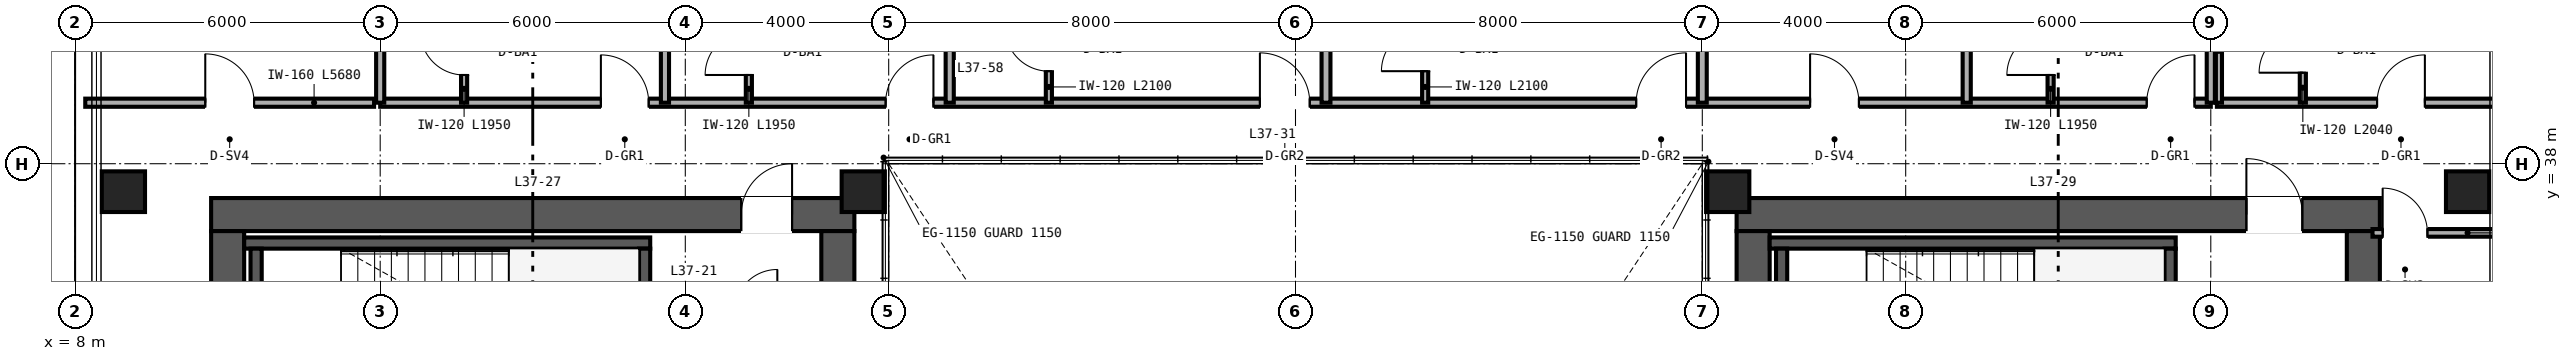
"""IFC4 building model, lengths in metres.
Left out: names, types, materials, properties, quantities, classifications, styles, units other than length and angle.
Written with IfcOpenShell. Run it as: python <this file> out.ifc"""

import sys

from ifc_helpers import new_model, si_unit, direction, frame, frame_2d, origin, origin_2d, place, context, subcontext, project, spatial, rectangle, hollow_rectangle, extrude, source, transform, mapped, element, fill, save


model = new_model("IFC4")
c1 = context("Model", 3, precision=1e-05, world=origin(), true_north=direction((0.0, 1.0)))
c2 = subcontext(c1, "Body", "Model", "MODEL_VIEW")
j1 = project(units=[si_unit("LENGTHUNIT", "METRE"), si_unit("PLANEANGLEUNIT", "RADIAN")], contexts=[c1])
p1 = place(None, origin())
s1 = spatial("IfcSite", under=j1, at=p1, CompositionType="ELEMENT")
p2 = place(p1, origin())
s2 = spatial("IfcBuilding", under=s1, at=p2, CompositionType="ELEMENT")
p3 = place(p2, frame((0.0, 0.0, 147.6)))
s3 = spatial("IfcBuildingStorey", under=s2, at=p3, CompositionType="ELEMENT", Elevation=147.6)
p4 = place(p3, frame((10.675, 37.0, 0.0), z_axis=(0.0, 0.0, 1.0), x_axis=(1.0, 0.0, 0.0)))
e1 = element("IfcWall", 1, at=p4, inside=s3, PredefinedType="SHEAR", context=c2, shape_type="SweptSolid", body=[
    extrude(rectangle(XDim=12.65, YDim=0.65, at=frame_2d((6.325, 0.0))), origin(), (0.0, 0.0, 1.0), 3.28),
])
p5 = place(p4, frame((10.425, 0.0, 0.0)))
e2 = element("IfcOpeningElement", 2, at=p5, cuts=e1, PredefinedType="OPENING", context=c2, shape_type="SweptSolid", body=[
    extrude(rectangle(XDim=1.0, YDim=2.15, at=frame_2d((0.5, 1.075))), frame((0.0, 0.335, 0.0), z_axis=(0.0, -1.0, 0.0), x_axis=(1.0, 0.0, 0.0)), (0.0, 0.0, 1.0), 0.67),
])
for number, where, z_axis, x_axis in (
    (3, (11.0, 15.325, 0.0), (0.0, 0.0, 1.0), (0.0, 1.0, 0.0)),
    (4, (23.0, 15.325, 0.0), (0.0, 0.0, 1.0), (0.0, 1.0, 0.0)),
):
    element("IfcWall", number, at=place(p3, frame(where, z_axis=z_axis, x_axis=x_axis)), inside=s3, PredefinedType="SHEAR", context=c2, shape_type="SweptSolid", body=[
        extrude(rectangle(XDim=21.35, YDim=0.65, at=frame_2d((10.675, 0.0))), origin(), (0.0, 0.0, 1.0), 3.28),
    ])
p6 = place(p3, frame((40.675, 37.0, 0.0), z_axis=(0.0, 0.0, 1.0), x_axis=(1.0, 0.0, 0.0)))
e5 = element("IfcWall", 5, at=p6, inside=s3, PredefinedType="SHEAR", context=c2, shape_type="SweptSolid", body=[
    extrude(rectangle(XDim=12.65, YDim=0.65, at=frame_2d((6.325, 0.0))), origin(), (0.0, 0.0, 1.0), 3.28),
])
p7 = place(p6, frame((10.025, 0.0, 0.0)))
e6 = element("IfcOpeningElement", 6, at=p7, cuts=e5, PredefinedType="OPENING", context=c2, shape_type="SweptSolid", body=[
    extrude(rectangle(XDim=1.1, YDim=2.15, at=frame_2d((0.55, 1.075))), frame((0.0, 0.335, 0.0), z_axis=(0.0, -1.0, 0.0), x_axis=(1.0, 0.0, 0.0)), (0.0, 0.0, 1.0), 0.67),
])
for number, where, z_axis, x_axis in (
    (7, (41.0, 15.325, 0.0), (0.0, 0.0, 1.0), (0.0, 1.0, 0.0)),
    (8, (53.0, 15.325, 0.0), (0.0, 0.0, 1.0), (0.0, 1.0, 0.0)),
):
    element("IfcWall", number, at=place(p3, frame(where, z_axis=z_axis, x_axis=x_axis)), inside=s3, PredefinedType="SHEAR", context=c2, shape_type="SweptSolid", body=[
        extrude(rectangle(XDim=21.35, YDim=0.65, at=frame_2d((10.675, 0.0))), origin(), (0.0, 0.0, 1.0), 3.28),
    ])
p8 = place(p3, frame((11.325, 36.44, 0.0), z_axis=(0.0, 0.0, 1.0), x_axis=(1.0, 0.0, 0.0)))
e9 = element("IfcWall", 9, at=p8, inside=s3, PredefinedType="SHEAR", context=c2, shape_type="SweptSolid", body=[
    extrude(rectangle(XDim=7.985, YDim=0.22, at=frame_2d((3.993, 0.0))), origin(), (0.0, 0.0, 1.0), 3.4),
])
for number, where, z_axis, x_axis in (
    (10, (11.56, 33.05, 0.0), (0.0, 0.0, 1.0), (0.0, 1.0, 0.0)),
    (11, (19.2, 33.05, 0.0), (0.0, 0.0, 1.0), (0.0, 1.0, 0.0)),
):
    element("IfcWall", number, at=place(p3, frame(where, z_axis=z_axis, x_axis=x_axis)), inside=s3, PredefinedType="SHEAR", context=c2, shape_type="SweptSolid", body=[
        extrude(rectangle(XDim=3.28, YDim=0.22, at=frame_2d((1.64, 0.0))), origin(), (0.0, 0.0, 1.0), 3.4),
    ])
p9 = place(p3, frame((41.325, 36.44, 0.0), z_axis=(0.0, 0.0, 1.0), x_axis=(1.0, 0.0, 0.0)))
e12 = element("IfcWall", 12, at=p9, inside=s3, PredefinedType="SHEAR", context=c2, shape_type="SweptSolid", body=[
    extrude(rectangle(XDim=7.985, YDim=0.22, at=frame_2d((3.993, 0.0))), origin(), (0.0, 0.0, 1.0), 3.4),
])
for number, where, z_axis, x_axis in (
    (13, (41.56, 33.05, 0.0), (0.0, 0.0, 1.0), (0.0, 1.0, 0.0)),
    (14, (49.2, 33.05, 0.0), (0.0, 0.0, 1.0), (0.0, 1.0, 0.0)),
):
    element("IfcWall", number, at=place(p3, frame(where, z_axis=z_axis, x_axis=x_axis)), inside=s3, PredefinedType="SHEAR", context=c2, shape_type="SweptSolid", body=[
        extrude(rectangle(XDim=3.28, YDim=0.22, at=frame_2d((1.64, 0.0))), origin(), (0.0, 0.0, 1.0), 3.4),
    ])
m1 = source(origin(), c2, "Body", "SweptSolid", [
    extrude(hollow_rectangle(XDim=0.85, YDim=0.8, WallThickness=0.032, at=origin_2d()), origin(), (0.0, 0.0, 1.0), 3.28),
])
for number, where, z_axis, x_axis in (
    (15, (8.95, 37.45, 0.0), (0.0, 0.0, 1.0), (1.0, 0.0, 0.0)),
    (16, (23.5, 37.45, 0.0), (0.0, 0.0, 1.0), (1.0, 0.0, 0.0)),
    (17, (40.5, 37.45, 0.0), (0.0, 0.0, 1.0), (1.0, 0.0, 0.0)),
    (18, (55.05, 37.45, 0.0), (0.0, 0.0, 1.0), (1.0, 0.0, 0.0)),
):
    element("IfcColumn", number, at=place(p3, frame(where, z_axis=z_axis, x_axis=x_axis)), inside=s3, PredefinedType="COLUMN", context=c2, shape_type="MappedRepresentation", body=[
        mapped(m1, transform((0.0, 0.0, 0.0), scale=1.0)),
    ])
p10 = place(p3, frame((53.18, 36.64, 0.0), z_axis=(0.0, 0.0, 1.0), x_axis=(1.0, 0.0, 0.0)))
e19 = element("IfcWall", 19, at=p10, inside=s3, PredefinedType="PARTITIONING", context=c2, shape_type="SweptSolid", body=[
    extrude(rectangle(XDim=2.66, YDim=0.15, at=frame_2d((1.33, 0.0))), origin(), (0.0, 0.0, 1.0), 2.663),
])
p11 = place(p10, frame((0.2, 0.0, 0.0)))
e20 = element("IfcOpeningElement", 20, at=p11, cuts=e19, PredefinedType="OPENING", context=c2, shape_type="SweptSolid", body=[
    extrude(rectangle(XDim=0.88, YDim=2.15, at=frame_2d((0.44, 1.075))), frame((0.0, 0.085, 0.0), z_axis=(0.0, -1.0, 0.0), x_axis=(1.0, 0.0, 0.0)), (0.0, 0.0, 1.0), 0.17),
])
p12 = place(p3, frame((8.2, 39.2, 0.0), z_axis=(0.0, 0.0, 1.0), x_axis=(1.0, 0.0, 0.0)))
e21 = element("IfcWall", 21, at=p12, inside=s3, PredefinedType="PARTITIONING", context=c2, shape_type="SweptSolid", body=[
    extrude(rectangle(XDim=5.68, YDim=0.16, at=frame_2d((2.84, 0.0))), origin(), (0.0, 0.0, 1.0), 3.28),
])
p13 = place(p12, frame((2.36, 0.0, 0.0)))
e22 = element("IfcOpeningElement", 22, at=p13, cuts=e21, PredefinedType="OPENING", context=c2, shape_type="SweptSolid", body=[
    extrude(rectangle(XDim=0.96, YDim=2.15, at=frame_2d((0.48, 1.075))), frame((0.0, 0.09, 0.0), z_axis=(0.0, -1.0, 0.0), x_axis=(1.0, 0.0, 0.0)), (0.0, 0.0, 1.0), 0.18),
])
p14 = place(p3, frame((50.12, 39.2, 0.0), z_axis=(0.0, 0.0, 1.0), x_axis=(1.0, 0.0, 0.0)))
e23 = element("IfcWall", 23, at=p14, inside=s3, PredefinedType="PARTITIONING", context=c2, shape_type="SweptSolid", body=[
    extrude(rectangle(XDim=5.68, YDim=0.16, at=frame_2d((2.84, 0.0))), origin(), (0.0, 0.0, 1.0), 3.28),
])
p15 = place(p14, frame((3.15, 0.0, 0.0)))
e24 = element("IfcOpeningElement", 24, at=p15, cuts=e23, PredefinedType="OPENING", context=c2, shape_type="SweptSolid", body=[
    extrude(rectangle(XDim=0.94, YDim=2.15, at=frame_2d((0.47, 1.075))), frame((0.0, 0.09, 0.0), z_axis=(0.0, -1.0, 0.0), x_axis=(1.0, 0.0, 0.0)), (0.0, 0.0, 1.0), 0.18),
])
p16 = place(p3, frame((51.81, 39.2, 0.0), z_axis=(0.0, 0.0, 1.0), x_axis=(0.0, 1.0, 0.0)))
e25 = element("IfcWall", 25, at=p16, inside=s3, PredefinedType="PARTITIONING", context=c2, shape_type="SweptSolid", body=[
    extrude(rectangle(XDim=2.04, YDim=0.12, at=frame_2d((1.02, 0.0))), origin(), (0.0, 0.0, 1.0), 3.28),
])
p17 = place(p16, frame((0.59, 0.0, 0.0)))
e26 = element("IfcOpeningElement", 26, at=p17, cuts=e25, PredefinedType="OPENING", context=c2, shape_type="SweptSolid", body=[
    extrude(rectangle(XDim=0.86, YDim=2.1, at=frame_2d((0.43, 1.05))), frame((0.0, 0.07, 0.0), z_axis=(0.0, -1.0, 0.0), x_axis=(1.0, 0.0, 0.0)), (0.0, 0.0, 1.0), 0.14),
])
p18 = place(p3, frame((50.16, 39.2, 0.0), z_axis=(0.0, 0.0, 1.0), x_axis=(0.0, 1.0, 0.0)))
e27 = element("IfcWall", 27, at=p18, inside=s3, PredefinedType="PARTITIONING", context=c2, shape_type="SweptSolid", body=[
    extrude(rectangle(XDim=2.04, YDim=0.12, at=frame_2d((1.02, 0.0))), origin(), (0.0, 0.0, 1.0), 3.28),
])
p19 = place(p3, frame((14.0, 39.2, 0.0), z_axis=(0.0, 0.0, 1.0), x_axis=(1.0, 0.0, 0.0)))
e28 = element("IfcWall", 28, at=p19, inside=s3, PredefinedType="PARTITIONING", context=c2, shape_type="SweptSolid", body=[
    extrude(rectangle(XDim=36.0, YDim=0.16, at=frame_2d((18.0, 0.0))), origin(), (0.0, 0.0, 1.0), 2.501),
])
p20 = place(p19, frame((4.34, 0.0, 0.0)))
e29 = element("IfcOpeningElement", 29, at=p20, cuts=e28, PredefinedType="OPENING", context=c2, shape_type="SweptSolid", body=[
    extrude(rectangle(XDim=0.94, YDim=2.15, at=frame_2d((0.47, 1.075))), frame((0.0, 0.09, 0.0), z_axis=(0.0, -1.0, 0.0), x_axis=(1.0, 0.0, 0.0)), (0.0, 0.0, 1.0), 0.18),
])
p21 = place(p19, frame((9.94, 0.0, 0.0)))
e30 = element("IfcOpeningElement", 30, at=p21, cuts=e28, PredefinedType="OPENING", context=c2, shape_type="SweptSolid", body=[
    extrude(rectangle(XDim=0.94, YDim=2.15, at=frame_2d((0.47, 1.075))), frame((0.0, 0.09, 0.0), z_axis=(0.0, -1.0, 0.0), x_axis=(1.0, 0.0, 0.0)), (0.0, 0.0, 1.0), 0.18),
])
p22 = place(p19, frame((17.3, 0.0, 0.0)))
e31 = element("IfcOpeningElement", 31, at=p22, cuts=e28, PredefinedType="OPENING", context=c2, shape_type="SweptSolid", body=[
    extrude(rectangle(XDim=0.98, YDim=2.2, at=frame_2d((0.49, 1.1))), frame((0.0, 0.09, 0.0), z_axis=(0.0, -1.0, 0.0), x_axis=(1.0, 0.0, 0.0)), (0.0, 0.0, 1.0), 0.18),
])
p23 = place(p19, frame((24.7, 0.0, 0.0)))
e32 = element("IfcOpeningElement", 32, at=p23, cuts=e28, PredefinedType="OPENING", context=c2, shape_type="SweptSolid", body=[
    extrude(rectangle(XDim=0.98, YDim=2.2, at=frame_2d((0.49, 1.1))), frame((0.0, 0.09, 0.0), z_axis=(0.0, -1.0, 0.0), x_axis=(1.0, 0.0, 0.0)), (0.0, 0.0, 1.0), 0.18),
])
p24 = place(p19, frame((28.12, 0.0, 0.0)))
e33 = element("IfcOpeningElement", 33, at=p24, cuts=e28, PredefinedType="OPENING", context=c2, shape_type="SweptSolid", body=[
    extrude(rectangle(XDim=0.96, YDim=2.15, at=frame_2d((0.48, 1.075))), frame((0.0, 0.09, 0.0), z_axis=(0.0, -1.0, 0.0), x_axis=(1.0, 0.0, 0.0)), (0.0, 0.0, 1.0), 0.18),
])
p25 = place(p19, frame((34.74, 0.0, 0.0)))
e34 = element("IfcOpeningElement", 34, at=p25, cuts=e28, PredefinedType="OPENING", context=c2, shape_type="SweptSolid", body=[
    extrude(rectangle(XDim=0.94, YDim=2.15, at=frame_2d((0.47, 1.075))), frame((0.0, 0.09, 0.0), z_axis=(0.0, -1.0, 0.0), x_axis=(1.0, 0.0, 0.0)), (0.0, 0.0, 1.0), 0.18),
])
for number, where, z_axis, x_axis in (
    (35, (14.0, 39.2, 0.0), (0.0, 0.0, 1.0), (0.0, 1.0, 0.0)),
    (36, (50.0, 39.2, 0.0), (0.0, 0.0, 1.0), (0.0, 1.0, 0.0)),
    (37, (19.6, 39.2, 0.0), (0.0, 0.0, 1.0), (0.0, 1.0, 0.0)),
):
    element("IfcWall", number, at=place(p3, frame(where, z_axis=z_axis, x_axis=x_axis)), inside=s3, PredefinedType="PARTITIONING", context=c2, shape_type="SweptSolid", body=[
        extrude(rectangle(XDim=10.44, YDim=0.16, at=frame_2d((5.22, 0.0))), origin(), (0.0, 0.0, 1.0), 2.587),
    ])
p26 = place(p3, frame((15.65, 39.2, 0.0), z_axis=(0.0, 0.0, 1.0), x_axis=(0.0, 1.0, 0.0)))
e38 = element("IfcWall", 38, at=p26, inside=s3, PredefinedType="PARTITIONING", context=c2, shape_type="SweptSolid", body=[
    extrude(rectangle(XDim=1.95, YDim=0.12, at=frame_2d((0.975, 0.0))), origin(), (0.0, 0.0, 1.0), 3.28),
])
p27 = place(p26, frame((0.545, 0.0, 0.0)))
e39 = element("IfcOpeningElement", 39, at=p27, cuts=e38, PredefinedType="OPENING", context=c2, shape_type="SweptSolid", body=[
    extrude(rectangle(XDim=0.86, YDim=2.1, at=frame_2d((0.43, 1.05))), frame((0.0, 0.07, 0.0), z_axis=(0.0, -1.0, 0.0), x_axis=(1.0, 0.0, 0.0)), (0.0, 0.0, 1.0), 0.14),
])
p28 = place(p3, frame((25.2, 39.2, 0.0), z_axis=(0.0, 0.0, 1.0), x_axis=(0.0, 1.0, 0.0)))
e40 = element("IfcWall", 40, at=p28, inside=s3, PredefinedType="PARTITIONING", context=c2, shape_type="SweptSolid", body=[
    extrude(rectangle(XDim=10.44, YDim=0.16, at=frame_2d((5.22, 0.0))), origin(), (0.0, 0.0, 1.0), 2.36),
])
p29 = place(p3, frame((21.25, 39.2, 0.0), z_axis=(0.0, 0.0, 1.0), x_axis=(0.0, 1.0, 0.0)))
e41 = element("IfcWall", 41, at=p29, inside=s3, PredefinedType="PARTITIONING", context=c2, shape_type="SweptSolid", body=[
    extrude(rectangle(XDim=1.95, YDim=0.12, at=frame_2d((0.975, 0.0))), origin(), (0.0, 0.0, 1.0), 3.28),
])
p30 = place(p29, frame((0.545, 0.0, 0.0)))
e42 = element("IfcOpeningElement", 42, at=p30, cuts=e41, PredefinedType="OPENING", context=c2, shape_type="SweptSolid", body=[
    extrude(rectangle(XDim=0.86, YDim=2.1, at=frame_2d((0.43, 1.05))), frame((0.0, 0.07, 0.0), z_axis=(0.0, -1.0, 0.0), x_axis=(1.0, 0.0, 0.0)), (0.0, 0.0, 1.0), 0.14),
])
p31 = place(p3, frame((32.6, 39.2, 0.0), z_axis=(0.0, 0.0, 1.0), x_axis=(0.0, 1.0, 0.0)))
e43 = element("IfcWall", 43, at=p31, inside=s3, PredefinedType="PARTITIONING", context=c2, shape_type="SweptSolid", body=[
    extrude(rectangle(XDim=10.44, YDim=0.175, at=frame_2d((5.22, 0.0))), origin(), (0.0, 0.0, 1.0), 2.36),
])
p32 = place(p3, frame((27.15, 39.2, 0.0), z_axis=(0.0, 0.0, 1.0), x_axis=(0.0, 1.0, 0.0)))
e44 = element("IfcWall", 44, at=p32, inside=s3, PredefinedType="PARTITIONING", context=c2, shape_type="SweptSolid", body=[
    extrude(rectangle(XDim=2.1, YDim=0.12, at=frame_2d((1.05, 0.0))), origin(), (0.0, 0.0, 1.0), 3.28),
])
p33 = place(p32, frame((0.62, 0.0, 0.0)))
e45 = element("IfcOpeningElement", 45, at=p33, cuts=e44, PredefinedType="OPENING", context=c2, shape_type="SweptSolid", body=[
    extrude(rectangle(XDim=0.86, YDim=2.1, at=frame_2d((0.43, 1.05))), frame((0.0, 0.07, 0.0), z_axis=(0.0, -1.0, 0.0), x_axis=(1.0, 0.0, 0.0)), (0.0, 0.0, 1.0), 0.14),
])
p34 = place(p3, frame((40.0, 39.2, 0.0), z_axis=(0.0, 0.0, 1.0), x_axis=(0.0, 1.0, 0.0)))
e46 = element("IfcWall", 46, at=p34, inside=s3, PredefinedType="PARTITIONING", context=c2, shape_type="SweptSolid", body=[
    extrude(rectangle(XDim=10.44, YDim=0.175, at=frame_2d((5.22, 0.0))), origin(), (0.0, 0.0, 1.0), 2.36),
])
p35 = place(p3, frame((34.55, 39.2, 0.0), z_axis=(0.0, 0.0, 1.0), x_axis=(0.0, 1.0, 0.0)))
e47 = element("IfcWall", 47, at=p35, inside=s3, PredefinedType="PARTITIONING", context=c2, shape_type="SweptSolid", body=[
    extrude(rectangle(XDim=2.1, YDim=0.12, at=frame_2d((1.05, 0.0))), origin(), (0.0, 0.0, 1.0), 3.28),
])
p36 = place(p35, frame((0.62, 0.0, 0.0)))
e48 = element("IfcOpeningElement", 48, at=p36, cuts=e47, PredefinedType="OPENING", context=c2, shape_type="SweptSolid", body=[
    extrude(rectangle(XDim=0.86, YDim=2.1, at=frame_2d((0.43, 1.05))), frame((0.0, 0.07, 0.0), z_axis=(0.0, -1.0, 0.0), x_axis=(1.0, 0.0, 0.0)), (0.0, 0.0, 1.0), 0.14),
])
p37 = place(p3, frame((45.2, 39.2, 0.0), z_axis=(0.0, 0.0, 1.0), x_axis=(0.0, 1.0, 0.0)))
e49 = element("IfcWall", 49, at=p37, inside=s3, PredefinedType="PARTITIONING", context=c2, shape_type="SweptSolid", body=[
    extrude(rectangle(XDim=10.44, YDim=0.16, at=frame_2d((5.22, 0.0))), origin(), (0.0, 0.0, 1.0), 2.587),
])
p38 = place(p3, frame((46.85, 39.2, 0.0), z_axis=(0.0, 0.0, 1.0), x_axis=(0.0, 1.0, 0.0)))
e50 = element("IfcWall", 50, at=p38, inside=s3, PredefinedType="PARTITIONING", context=c2, shape_type="SweptSolid", body=[
    extrude(rectangle(XDim=1.95, YDim=0.12, at=frame_2d((0.975, 0.0))), origin(), (0.0, 0.0, 1.0), 3.28),
])
p39 = place(p38, frame((0.545, 0.0, 0.0)))
e51 = element("IfcOpeningElement", 51, at=p39, cuts=e50, PredefinedType="OPENING", context=c2, shape_type="SweptSolid", body=[
    extrude(rectangle(XDim=0.86, YDim=2.1, at=frame_2d((0.43, 1.05))), frame((0.0, 0.07, 0.0), z_axis=(0.0, -1.0, 0.0), x_axis=(1.0, 0.0, 0.0)), (0.0, 0.0, 1.0), 0.14),
])
m2 = source(origin(), c2, "Body", "SweptSolid", [
    extrude(rectangle(XDim=1.0, YDim=2.15, at=frame_2d((0.5, 1.075))), frame((0.0, 0.025, 0.0), z_axis=(0.0, -1.0, 0.0), x_axis=(1.0, 0.0, 0.0)), (0.0, 0.0, 1.0), 0.05),
])
p40 = place(p5, origin())
e52 = element("IfcDoor", 52, at=p40, inside=s3, OperationType="SINGLE_SWING_RIGHT", PredefinedType="DOOR", context=c2, shape_type="MappedRepresentation", body=[
    mapped(m2, transform((0.0, 0.0, 0.0), scale=1.0)),
])
fill(e2, e52)
m3 = source(origin(), c2, "Body", "SweptSolid", [
    extrude(rectangle(XDim=1.1, YDim=2.15, at=frame_2d((0.55, 1.075))), frame((0.0, 0.025, 0.0), z_axis=(0.0, -1.0, 0.0), x_axis=(1.0, 0.0, 0.0)), (0.0, 0.0, 1.0), 0.05),
])
p41 = place(p7, origin())
e53 = element("IfcDoor", 53, at=p41, inside=s3, OperationType="SINGLE_SWING_LEFT", PredefinedType="DOOR", context=c2, shape_type="MappedRepresentation", body=[
    mapped(m3, transform((0.0, 0.0, 0.0), scale=1.0)),
])
fill(e6, e53)
m4 = source(origin(), c2, "Body", "SweptSolid", [
    extrude(rectangle(XDim=0.88, YDim=2.15, at=frame_2d((0.44, 1.075))), frame((0.0, 0.025, 0.0), z_axis=(0.0, -1.0, 0.0), x_axis=(1.0, 0.0, 0.0)), (0.0, 0.0, 1.0), 0.05),
])
p42 = place(p11, origin())
e54 = element("IfcDoor", 54, at=p42, inside=s3, OperationType="SINGLE_SWING_LEFT", PredefinedType="DOOR", context=c2, shape_type="MappedRepresentation", body=[
    mapped(m4, transform((0.0, 0.0, 0.0), scale=1.0)),
])
fill(e20, e54)
m5 = source(origin(), c2, "Body", "SweptSolid", [
    extrude(rectangle(XDim=0.96, YDim=2.15, at=frame_2d((0.48, 1.075))), frame((0.0, 0.025, 0.0), z_axis=(0.0, -1.0, 0.0), x_axis=(1.0, 0.0, 0.0)), (0.0, 0.0, 1.0), 0.05),
])
p43 = place(p13, origin())
e55 = element("IfcDoor", 55, at=p43, inside=s3, OperationType="SINGLE_SWING_LEFT", PredefinedType="DOOR", context=c2, shape_type="MappedRepresentation", body=[
    mapped(m5, transform((0.0, 0.0, 0.0), scale=1.0)),
])
fill(e22, e55)
m6 = source(origin(), c2, "Body", "SweptSolid", [
    extrude(rectangle(XDim=0.86, YDim=2.1, at=frame_2d((0.43, 1.05))), frame((0.0, 0.025, 0.0), z_axis=(0.0, -1.0, 0.0), x_axis=(1.0, 0.0, 0.0)), (0.0, 0.0, 1.0), 0.05),
])
p44 = place(p17, origin())
e56 = element("IfcDoor", 56, at=p44, inside=s3, OperationType="SINGLE_SWING_LEFT", PredefinedType="DOOR", context=c2, shape_type="MappedRepresentation", body=[
    mapped(m6, transform((0.0, 0.0, 0.0), scale=1.0)),
])
fill(e26, e56)
m7 = source(origin(), c2, "Body", "SweptSolid", [
    extrude(rectangle(XDim=0.94, YDim=2.15, at=frame_2d((0.47, 1.075))), frame((0.0, 0.025, 0.0), z_axis=(0.0, -1.0, 0.0), x_axis=(1.0, 0.0, 0.0)), (0.0, 0.0, 1.0), 0.05),
])
p45 = place(p15, origin())
e57 = element("IfcDoor", 57, at=p45, inside=s3, OperationType="SINGLE_SWING_RIGHT", PredefinedType="DOOR", context=c2, shape_type="MappedRepresentation", body=[
    mapped(m7, transform((0.0, 0.0, 0.0), scale=1.0)),
])
fill(e24, e57)
p46 = place(p27, origin())
e58 = element("IfcDoor", 58, at=p46, inside=s3, OperationType="SINGLE_SWING_RIGHT", PredefinedType="DOOR", context=c2, shape_type="MappedRepresentation", body=[
    mapped(m6, transform((0.0, 0.0, 0.0), scale=1.0)),
])
fill(e39, e58)
p47 = place(p30, origin())
e59 = element("IfcDoor", 59, at=p47, inside=s3, OperationType="SINGLE_SWING_LEFT", PredefinedType="DOOR", context=c2, shape_type="MappedRepresentation", body=[
    mapped(m6, transform((0.0, 0.0, 0.0), scale=1.0)),
])
fill(e42, e59)
p48 = place(p33, origin())
e60 = element("IfcDoor", 60, at=p48, inside=s3, OperationType="SINGLE_SWING_RIGHT", PredefinedType="DOOR", context=c2, shape_type="MappedRepresentation", body=[
    mapped(m6, transform((0.0, 0.0, 0.0), scale=1.0)),
])
fill(e45, e60)
p49 = place(p36, origin())
e61 = element("IfcDoor", 61, at=p49, inside=s3, OperationType="SINGLE_SWING_LEFT", PredefinedType="DOOR", context=c2, shape_type="MappedRepresentation", body=[
    mapped(m6, transform((0.0, 0.0, 0.0), scale=1.0)),
])
fill(e48, e61)
p50 = place(p39, origin())
e62 = element("IfcDoor", 62, at=p50, inside=s3, OperationType="SINGLE_SWING_LEFT", PredefinedType="DOOR", context=c2, shape_type="MappedRepresentation", body=[
    mapped(m6, transform((0.0, 0.0, 0.0), scale=1.0)),
])
fill(e51, e62)
p51 = place(p20, origin())
e63 = element("IfcDoor", 63, at=p51, inside=s3, OperationType="SINGLE_SWING_LEFT", PredefinedType="DOOR", context=c2, shape_type="MappedRepresentation", body=[
    mapped(m7, transform((0.0, 0.0, 0.0), scale=1.0)),
])
fill(e29, e63)
p52 = place(p21, origin())
e64 = element("IfcDoor", 64, at=p52, inside=s3, OperationType="SINGLE_SWING_RIGHT", PredefinedType="DOOR", context=c2, shape_type="MappedRepresentation", body=[
    mapped(m7, transform((0.0, 0.0, 0.0), scale=1.0)),
])
fill(e30, e64)
m8 = source(origin(), c2, "Body", "SweptSolid", [
    extrude(rectangle(XDim=0.98, YDim=2.2, at=frame_2d((0.49, 1.1))), frame((0.0, 0.025, 0.0), z_axis=(0.0, -1.0, 0.0), x_axis=(1.0, 0.0, 0.0)), (0.0, 0.0, 1.0), 0.05),
])
p53 = place(p22, origin())
e65 = element("IfcDoor", 65, at=p53, inside=s3, OperationType="SINGLE_SWING_LEFT", PredefinedType="DOOR", context=c2, shape_type="MappedRepresentation", body=[
    mapped(m8, transform((0.0, 0.0, 0.0), scale=1.0)),
])
fill(e31, e65)
p54 = place(p23, origin())
e66 = element("IfcDoor", 66, at=p54, inside=s3, OperationType="SINGLE_SWING_RIGHT", PredefinedType="DOOR", context=c2, shape_type="MappedRepresentation", body=[
    mapped(m8, transform((0.0, 0.0, 0.0), scale=1.0)),
])
fill(e32, e66)
p55 = place(p24, origin())
e67 = element("IfcDoor", 67, at=p55, inside=s3, OperationType="SINGLE_SWING_LEFT", PredefinedType="DOOR", context=c2, shape_type="MappedRepresentation", body=[
    mapped(m5, transform((0.0, 0.0, 0.0), scale=1.0)),
])
fill(e33, e67)
p56 = place(p25, origin())
e68 = element("IfcDoor", 68, at=p56, inside=s3, OperationType="SINGLE_SWING_RIGHT", PredefinedType="DOOR", context=c2, shape_type="MappedRepresentation", body=[
    mapped(m7, transform((0.0, 0.0, 0.0), scale=1.0)),
])
fill(e34, e68)
save(model, sys.argv[1])
